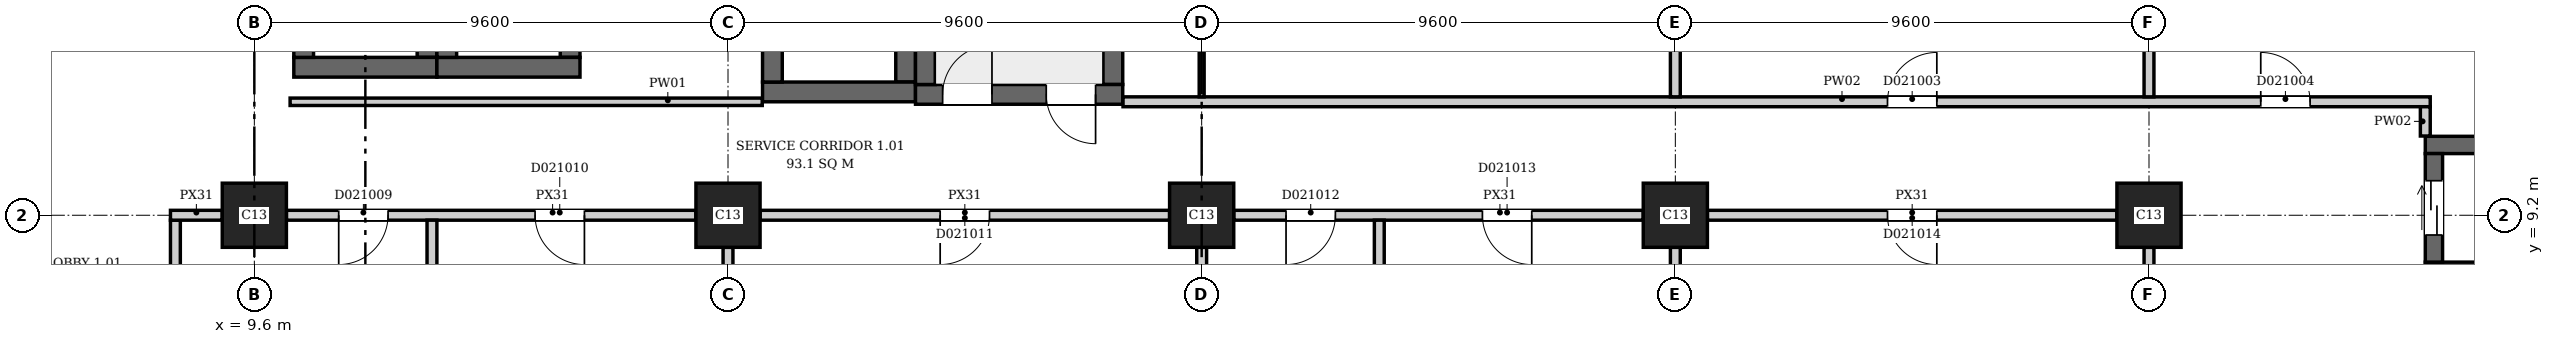
"""IFC4 building model, lengths in metres.
Left out: names, types, materials, properties, quantities, classifications, styles, units other than length and angle.
Written with IfcOpenShell. Run it as: python <this file> out.ifc"""

import sys

from ifc_helpers import new_model, si_unit, direction, frame, frame_2d, origin, origin_2d, place, context, subcontext, project, spatial, rectangle, extrude, element, fill, save


model = new_model("IFC4")
c1 = context("Model", 3, precision=1e-05, world=origin(), true_north=direction((0.0, 1.0)))
c2 = subcontext(c1, "Body", "Model", "MODEL_VIEW")
j1 = project(units=[si_unit("LENGTHUNIT", "METRE"), si_unit("PLANEANGLEUNIT", "RADIAN")], contexts=[c1])
p1 = place(None, origin())
s1 = spatial("IfcSite", under=j1, at=p1, CompositionType="ELEMENT")
p2 = place(p1, origin())
s2 = spatial("IfcBuilding", under=s1, at=p2, CompositionType="ELEMENT")
p3 = place(p2, frame((0.0, 0.0, 6.5)))
s3 = spatial("IfcBuildingStorey", under=s2, at=p3, CompositionType="ELEMENT", Elevation=6.5)
p4 = place(p3, frame((23.0, 11.65, 0.0), z_axis=(0.0, 0.0, 1.0), x_axis=(1.0, 0.0, 0.0)))
e1 = element("IfcWall", 1, at=p4, inside=s3, PredefinedType="SHEAR", context=c2, shape_type="SweptSolid", body=[
    extrude(rectangle(XDim=4.2, YDim=0.4, at=frame_2d((2.1, 0.0))), origin(), (0.0, 0.0, 1.0), 7.7),
])
p5 = place(p4, frame((0.55, 0.0, 0.0)))
e2 = element("IfcOpeningElement", 2, at=p5, cuts=e1, PredefinedType="OPENING", context=c2, shape_type="SweptSolid", body=[
    extrude(rectangle(XDim=1.0, YDim=2.1, at=frame_2d((0.5, 1.05))), frame((0.0, 0.21, 0.0), z_axis=(0.0, -1.0, 0.0), x_axis=(1.0, 0.0, 0.0)), (0.0, 0.0, 1.0), 0.42),
])
p6 = place(p4, frame((2.65, 0.0, 0.0)))
e3 = element("IfcOpeningElement", 3, at=p6, cuts=e1, PredefinedType="OPENING", context=c2, shape_type="SweptSolid", body=[
    extrude(rectangle(XDim=1.0, YDim=2.1, at=frame_2d((0.5, 1.05))), frame((0.0, 0.21, 0.0), z_axis=(0.0, -1.0, 0.0), x_axis=(1.0, 0.0, 0.0)), (0.0, 0.0, 1.0), 0.42),
])
for number, where, z_axis, x_axis in (
    (4, (23.2, 11.85, 0.0), (0.0, 0.0, 1.0), (0.0, 1.0, 0.0)),
    (5, (27.0, 11.85, 0.0), (0.0, 0.0, 1.0), (0.0, 1.0, 0.0)),
):
    element("IfcWall", number, at=place(p3, frame(where, z_axis=z_axis, x_axis=x_axis)), inside=s3, PredefinedType="SHEAR", context=c2, shape_type="SweptSolid", body=[
        extrude(rectangle(XDim=6.6, YDim=0.4, at=frame_2d((3.3, 0.0))), origin(), (0.0, 0.0, 1.0), 7.7),
    ])
for number, where, z_axis, x_axis in (
    (6, (53.6, 8.075, 0.0), (0.0, 0.0, 1.0), (1.0, 0.0, 0.0)),
    (7, (53.6, 10.625, 0.0), (0.0, 0.0, 1.0), (1.0, 0.0, 0.0)),
):
    element("IfcWall", number, at=place(p3, frame(where, z_axis=z_axis, x_axis=x_axis)), inside=s3, PredefinedType="SHEAR", context=c2, shape_type="SweptSolid", body=[
        extrude(rectangle(XDim=3.8, YDim=0.35, at=frame_2d((1.9, 0.0))), origin(), (0.0, 0.0, 1.0), 7.7),
    ])
p7 = place(p3, frame((53.775, 8.25, 0.0), z_axis=(0.0, 0.0, 1.0), x_axis=(0.0, 1.0, 0.0)))
e8 = element("IfcWall", 8, at=p7, inside=s3, PredefinedType="SHEAR", context=c2, shape_type="SweptSolid", body=[
    extrude(rectangle(XDim=2.2, YDim=0.35, at=frame_2d((1.1, 0.0))), origin(), (0.0, 0.0, 1.0), 7.7),
])
p8 = place(p7, frame((0.55, 0.0, 0.0)))
e9 = element("IfcOpeningElement", 9, at=p8, cuts=e8, PredefinedType="OPENING", context=c2, shape_type="SweptSolid", body=[
    extrude(rectangle(XDim=1.1, YDim=2.1, at=frame_2d((0.55, 1.05))), frame((0.0, 0.185, 0.0), z_axis=(0.0, -1.0, 0.0), x_axis=(1.0, 0.0, 0.0)), (0.0, 0.0, 1.0), 0.37),
])
p9 = place(p3, frame((10.4, 12.2, 0.0), z_axis=(0.0, 0.0, 1.0), x_axis=(1.0, 0.0, 0.0)))
e10 = element("IfcWall", 10, at=p9, inside=s3, PredefinedType="SHEAR", context=c2, shape_type="SweptSolid", body=[
    extrude(rectangle(XDim=2.9, YDim=0.4, at=frame_2d((1.45, 0.0))), origin(), (0.0, 0.0, 1.0), 7.7),
])
for number, where, z_axis, x_axis in (
    (11, (10.6, 12.4, 0.0), (0.0, 0.0, 1.0), (0.0, 1.0, 0.0)),
    (12, (13.1, 12.4, 0.0), (0.0, 0.0, 1.0), (0.0, 1.0, 0.0)),
):
    element("IfcWall", number, at=place(p3, frame(where, z_axis=z_axis, x_axis=x_axis)), inside=s3, PredefinedType="SHEAR", context=c2, shape_type="SweptSolid", body=[
        extrude(rectangle(XDim=3.0, YDim=0.4, at=frame_2d((1.5, 0.0))), origin(), (0.0, 0.0, 1.0), 7.7),
    ])
p10 = place(p3, frame((13.3, 12.2, 0.0), z_axis=(0.0, 0.0, 1.0), x_axis=(1.0, 0.0, 0.0)))
e13 = element("IfcWall", 13, at=p10, inside=s3, PredefinedType="SHEAR", context=c2, shape_type="SweptSolid", body=[
    extrude(rectangle(XDim=2.9, YDim=0.4, at=frame_2d((1.45, 0.0))), origin(), (0.0, 0.0, 1.0), 7.7),
])
for number, where, z_axis, x_axis in (
    (14, (13.5, 12.4, 0.0), (0.0, 0.0, 1.0), (0.0, 1.0, 0.0)),
    (15, (16.0, 12.4, 0.0), (0.0, 0.0, 1.0), (0.0, 1.0, 0.0)),
):
    element("IfcWall", number, at=place(p3, frame(where, z_axis=z_axis, x_axis=x_axis)), inside=s3, PredefinedType="SHEAR", context=c2, shape_type="SweptSolid", body=[
        extrude(rectangle(XDim=3.0, YDim=0.4, at=frame_2d((1.5, 0.0))), origin(), (0.0, 0.0, 1.0), 7.7),
    ])
p11 = place(p3, frame((19.9, 11.7, 0.0), z_axis=(0.0, 0.0, 1.0), x_axis=(1.0, 0.0, 0.0)))
e16 = element("IfcWall", 16, at=p11, inside=s3, PredefinedType="SHEAR", context=c2, shape_type="SweptSolid", body=[
    extrude(rectangle(XDim=3.1, YDim=0.4, at=frame_2d((1.55, 0.0))), origin(), (0.0, 0.0, 1.0), 7.7),
])
for number, where, z_axis, x_axis in (
    (17, (20.1, 11.9, 0.0), (0.0, 0.0, 1.0), (0.0, 1.0, 0.0)),
    (18, (22.8, 11.9, 0.0), (0.0, 0.0, 1.0), (0.0, 1.0, 0.0)),
):
    element("IfcWall", number, at=place(p3, frame(where, z_axis=z_axis, x_axis=x_axis)), inside=s3, PredefinedType="SHEAR", context=c2, shape_type="SweptSolid", body=[
        extrude(rectangle(XDim=3.4, YDim=0.4, at=frame_2d((1.7, 0.0))), origin(), (0.0, 0.0, 1.0), 7.7),
    ])
for number, where, z_axis, x_axis in (
    (19, (9.6, 9.2, 0.0), (0.0, 0.0, 1.0), (1.0, 0.0, 0.0)),
    (20, (19.2, 9.2, 0.0), (0.0, 0.0, 1.0), (1.0, 0.0, 0.0)),
    (21, (28.8, 9.2, 0.0), (0.0, 0.0, 1.0), (1.0, 0.0, 0.0)),
    (22, (38.4, 9.2, 0.0), (0.0, 0.0, 1.0), (1.0, 0.0, 0.0)),
    (23, (48.0, 9.2, 0.0), (0.0, 0.0, 1.0), (1.0, 0.0, 0.0)),
):
    element("IfcColumn", number, at=place(p3, frame(where, z_axis=z_axis, x_axis=x_axis)), inside=s3, PredefinedType="COLUMN", context=c2, shape_type="SweptSolid", body=[
        extrude(rectangle(XDim=1.3, YDim=1.3, at=origin_2d()), origin(), (0.0, 0.0, 1.0), 7.7),
    ])
p12 = place(p3, frame((8.0, 0.206, 0.0), z_axis=(0.0, 0.0, 1.0), x_axis=(0.0, 1.0, 0.0)))
e24 = element("IfcWall", 24, at=p12, inside=s3, PredefinedType="PARTITIONING", context=c2, shape_type="SweptSolid", body=[
    extrude(rectangle(XDim=8.894, YDim=0.2, at=frame_2d((4.447, 0.0))), origin(), (0.0, 0.0, 1.0), 7.35),
])
p13 = place(p3, frame((7.9, 9.2, 0.0), z_axis=(0.0, 0.0, 1.0), x_axis=(1.0, 0.0, 0.0)))
e25 = element("IfcWall", 25, at=p13, inside=s3, PredefinedType="PARTITIONING", context=c2, shape_type="SweptSolid", body=[
    extrude(rectangle(XDim=1.05, YDim=0.2, at=frame_2d((0.525, 0.0))), origin(), (0.0, 0.0, 1.0), 6.95),
])
p14 = place(p3, frame((10.25, 9.2, 0.0), z_axis=(0.0, 0.0, 1.0), x_axis=(1.0, 0.0, 0.0)))
e26 = element("IfcWall", 26, at=p14, inside=s3, PredefinedType="PARTITIONING", context=c2, shape_type="SweptSolid", body=[
    extrude(rectangle(XDim=8.3, YDim=0.2, at=frame_2d((4.15, 0.0))), origin(), (0.0, 0.0, 1.0), 6.95),
])
p15 = place(p14, frame((1.06, 0.0, 0.0)))
e27 = element("IfcOpeningElement", 27, at=p15, cuts=e26, PredefinedType="OPENING", context=c2, shape_type="SweptSolid", body=[
    extrude(rectangle(XDim=1.0, YDim=2.1, at=frame_2d((0.5, 1.05))), frame((0.0, 0.11, 0.0), z_axis=(0.0, -1.0, 0.0), x_axis=(1.0, 0.0, 0.0)), (0.0, 0.0, 1.0), 0.22),
])
p16 = place(p14, frame((5.04, 0.0, 0.0)))
e28 = element("IfcOpeningElement", 28, at=p16, cuts=e26, PredefinedType="OPENING", context=c2, shape_type="SweptSolid", body=[
    extrude(rectangle(XDim=1.0, YDim=2.1, at=frame_2d((0.5, 1.05))), frame((0.0, 0.11, 0.0), z_axis=(0.0, -1.0, 0.0), x_axis=(1.0, 0.0, 0.0)), (0.0, 0.0, 1.0), 0.22),
])
p17 = place(p3, frame((10.325, 11.5, 0.0), z_axis=(0.0, 0.0, 1.0), x_axis=(1.0, 0.0, 0.0)))
e29 = element("IfcWall", 29, at=p17, inside=s3, PredefinedType="PARTITIONING", context=c2, shape_type="SweptSolid", body=[
    extrude(rectangle(XDim=9.569, YDim=0.15, at=frame_2d((4.785, 0.0))), origin(), (0.0, 0.0, 1.0), 7.35),
])
p18 = place(p3, frame((13.2, 0.206, 0.0), z_axis=(0.0, 0.0, 1.0), x_axis=(0.0, 1.0, 0.0)))
e30 = element("IfcWall", 30, at=p18, inside=s3, PredefinedType="PARTITIONING", context=c2, shape_type="SweptSolid", body=[
    extrude(rectangle(XDim=8.894, YDim=0.2, at=frame_2d((4.447, 0.0))), origin(), (0.0, 0.0, 1.0), 7.35),
])
p19 = place(p3, frame((19.2, 1.1, 0.0), z_axis=(0.0, 0.0, 1.0), x_axis=(0.0, 1.0, 0.0)))
e31 = element("IfcWall", 31, at=p19, inside=s3, PredefinedType="PARTITIONING", context=c2, shape_type="SweptSolid", body=[
    extrude(rectangle(XDim=7.45, YDim=0.2, at=frame_2d((3.725, 0.0))), origin(), (0.0, 0.0, 1.0), 6.95),
])
p20 = place(p3, frame((19.85, 9.2, 0.0), z_axis=(0.0, 0.0, 1.0), x_axis=(1.0, 0.0, 0.0)))
e32 = element("IfcWall", 32, at=p20, inside=s3, PredefinedType="PARTITIONING", context=c2, shape_type="SweptSolid", body=[
    extrude(rectangle(XDim=8.3, YDim=0.2, at=frame_2d((4.15, 0.0))), origin(), (0.0, 0.0, 1.0), 6.95),
])
p21 = place(p20, frame((3.65, 0.0, 0.0)))
e33 = element("IfcOpeningElement", 33, at=p21, cuts=e32, PredefinedType="OPENING", context=c2, shape_type="SweptSolid", body=[
    extrude(rectangle(XDim=1.0, YDim=2.1, at=frame_2d((0.5, 1.05))), frame((0.0, 0.11, 0.0), z_axis=(0.0, -1.0, 0.0), x_axis=(1.0, 0.0, 0.0)), (0.0, 0.0, 1.0), 0.22),
])
p22 = place(p3, frame((27.206, 11.5, 0.0), z_axis=(0.0, 0.0, 1.0), x_axis=(1.0, 0.0, 0.0)))
e34 = element("IfcWall", 34, at=p22, inside=s3, PredefinedType="PARTITIONING", context=c2, shape_type="SweptSolid", body=[
    extrude(rectangle(XDim=26.494, YDim=0.2, at=frame_2d((13.247, 0.0))), origin(), (0.0, 0.0, 1.0), 7.35),
])
p23 = place(p22, frame((15.494, 0.0, 0.0)))
e35 = element("IfcOpeningElement", 35, at=p23, cuts=e34, PredefinedType="OPENING", context=c2, shape_type="SweptSolid", body=[
    extrude(rectangle(XDim=1.0, YDim=2.1, at=frame_2d((0.5, 1.05))), frame((0.0, 0.11, 0.0), z_axis=(0.0, -1.0, 0.0), x_axis=(1.0, 0.0, 0.0)), (0.0, 0.0, 1.0), 0.22),
])
p24 = place(p22, frame((23.059, 0.0, 0.0)))
e36 = element("IfcOpeningElement", 36, at=p24, cuts=e34, PredefinedType="OPENING", context=c2, shape_type="SweptSolid", body=[
    extrude(rectangle(XDim=1.0, YDim=2.1, at=frame_2d((0.5, 1.05))), frame((0.0, 0.11, 0.0), z_axis=(0.0, -1.0, 0.0), x_axis=(1.0, 0.0, 0.0)), (0.0, 0.0, 1.0), 0.22),
])
p25 = place(p3, frame((28.8, 1.1, 0.0), z_axis=(0.0, 0.0, 1.0), x_axis=(0.0, 1.0, 0.0)))
e37 = element("IfcWall", 37, at=p25, inside=s3, PredefinedType="PARTITIONING", context=c2, shape_type="SweptSolid", body=[
    extrude(rectangle(XDim=7.45, YDim=0.2, at=frame_2d((3.725, 0.0))), origin(), (0.0, 0.0, 1.0), 6.95),
])
p26 = place(p3, frame((28.8, 11.6, 0.0), z_axis=(0.0, 0.0, 1.0), x_axis=(0.0, 1.0, 0.0)))
e38 = element("IfcWall", 38, at=p26, inside=s3, PredefinedType="PARTITIONING", context=c2, shape_type="SweptSolid", body=[
    extrude(rectangle(XDim=4.025, YDim=0.1, at=frame_2d((2.012, 0.0))), origin(), (0.0, 0.0, 1.0), 6.95),
])
p27 = place(p3, frame((29.45, 9.2, 0.0), z_axis=(0.0, 0.0, 1.0), x_axis=(1.0, 0.0, 0.0)))
e39 = element("IfcWall", 39, at=p27, inside=s3, PredefinedType="PARTITIONING", context=c2, shape_type="SweptSolid", body=[
    extrude(rectangle(XDim=8.3, YDim=0.2, at=frame_2d((4.15, 0.0))), origin(), (0.0, 0.0, 1.0), 6.95),
])
p28 = place(p27, frame((1.06, 0.0, 0.0)))
e40 = element("IfcOpeningElement", 40, at=p28, cuts=e39, PredefinedType="OPENING", context=c2, shape_type="SweptSolid", body=[
    extrude(rectangle(XDim=1.0, YDim=2.1, at=frame_2d((0.5, 1.05))), frame((0.0, 0.11, 0.0), z_axis=(0.0, -1.0, 0.0), x_axis=(1.0, 0.0, 0.0)), (0.0, 0.0, 1.0), 0.22),
])
p29 = place(p27, frame((5.04, 0.0, 0.0)))
e41 = element("IfcOpeningElement", 41, at=p29, cuts=e39, PredefinedType="OPENING", context=c2, shape_type="SweptSolid", body=[
    extrude(rectangle(XDim=1.0, YDim=2.1, at=frame_2d((0.5, 1.05))), frame((0.0, 0.11, 0.0), z_axis=(0.0, -1.0, 0.0), x_axis=(1.0, 0.0, 0.0)), (0.0, 0.0, 1.0), 0.22),
])
p30 = place(p3, frame((32.4, 0.206, 0.0), z_axis=(0.0, 0.0, 1.0), x_axis=(0.0, 1.0, 0.0)))
e42 = element("IfcWall", 42, at=p30, inside=s3, PredefinedType="PARTITIONING", context=c2, shape_type="SweptSolid", body=[
    extrude(rectangle(XDim=8.894, YDim=0.2, at=frame_2d((4.447, 0.0))), origin(), (0.0, 0.0, 1.0), 7.35),
])
p31 = place(p3, frame((38.4, 1.1, 0.0), z_axis=(0.0, 0.0, 1.0), x_axis=(0.0, 1.0, 0.0)))
e43 = element("IfcWall", 43, at=p31, inside=s3, PredefinedType="PARTITIONING", context=c2, shape_type="SweptSolid", body=[
    extrude(rectangle(XDim=7.45, YDim=0.2, at=frame_2d((3.725, 0.0))), origin(), (0.0, 0.0, 1.0), 6.95),
])
p32 = place(p3, frame((38.4, 11.6, 0.0), z_axis=(0.0, 0.0, 1.0), x_axis=(0.0, 1.0, 0.0)))
e44 = element("IfcWall", 44, at=p32, inside=s3, PredefinedType="PARTITIONING", context=c2, shape_type="SweptSolid", body=[
    extrude(rectangle(XDim=6.15, YDim=0.2, at=frame_2d((3.075, 0.0))), origin(), (0.0, 0.0, 1.0), 6.95),
])
p33 = place(p3, frame((39.05, 9.2, 0.0), z_axis=(0.0, 0.0, 1.0), x_axis=(1.0, 0.0, 0.0)))
e45 = element("IfcWall", 45, at=p33, inside=s3, PredefinedType="PARTITIONING", context=c2, shape_type="SweptSolid", body=[
    extrude(rectangle(XDim=8.3, YDim=0.2, at=frame_2d((4.15, 0.0))), origin(), (0.0, 0.0, 1.0), 6.95),
])
p34 = place(p33, frame((3.65, 0.0, 0.0)))
e46 = element("IfcOpeningElement", 46, at=p34, cuts=e45, PredefinedType="OPENING", context=c2, shape_type="SweptSolid", body=[
    extrude(rectangle(XDim=1.0, YDim=2.1, at=frame_2d((0.5, 1.05))), frame((0.0, 0.11, 0.0), z_axis=(0.0, -1.0, 0.0), x_axis=(1.0, 0.0, 0.0)), (0.0, 0.0, 1.0), 0.22),
])
p35 = place(p3, frame((48.0, 1.1, 0.0), z_axis=(0.0, 0.0, 1.0), x_axis=(0.0, 1.0, 0.0)))
e47 = element("IfcWall", 47, at=p35, inside=s3, PredefinedType="PARTITIONING", context=c2, shape_type="SweptSolid", body=[
    extrude(rectangle(XDim=7.45, YDim=0.2, at=frame_2d((3.725, 0.0))), origin(), (0.0, 0.0, 1.0), 6.95),
])
p36 = place(p3, frame((48.0, 11.6, 0.0), z_axis=(0.0, 0.0, 1.0), x_axis=(0.0, 1.0, 0.0)))
e48 = element("IfcWall", 48, at=p36, inside=s3, PredefinedType="PARTITIONING", context=c2, shape_type="SweptSolid", body=[
    extrude(rectangle(XDim=6.15, YDim=0.2, at=frame_2d((3.075, 0.0))), origin(), (0.0, 0.0, 1.0), 6.95),
])
p37 = place(p3, frame((53.6, 10.806, 0.0), z_axis=(0.0, 0.0, 1.0), x_axis=(0.0, 1.0, 0.0)))
e49 = element("IfcWall", 49, at=p37, inside=s3, PredefinedType="PARTITIONING", context=c2, shape_type="SweptSolid", body=[
    extrude(rectangle(XDim=0.594, YDim=0.2, at=frame_2d((0.297, 0.0))), origin(), (0.0, 0.0, 1.0), 7.35),
])
p38 = place(p5, origin())
e50 = element("IfcDoor", 50, at=p38, inside=s3, OperationType="SINGLE_SWING_RIGHT", PredefinedType="DOOR", context=c2, shape_type="SweptSolid", body=[
    extrude(rectangle(XDim=1.0, YDim=2.1, at=frame_2d((0.5, 1.05))), frame((0.0, 0.025, 0.0), z_axis=(0.0, -1.0, 0.0), x_axis=(1.0, 0.0, 0.0)), (0.0, 0.0, 1.0), 0.05),
])
fill(e2, e50)
p39 = place(p6, origin())
e51 = element("IfcDoor", 51, at=p39, inside=s3, OperationType="SINGLE_SWING_LEFT", PredefinedType="DOOR", context=c2, shape_type="SweptSolid", body=[
    extrude(rectangle(XDim=1.0, YDim=2.1, at=frame_2d((0.5, 1.05))), frame((0.0, 0.025, 0.0), z_axis=(0.0, -1.0, 0.0), x_axis=(1.0, 0.0, 0.0)), (0.0, 0.0, 1.0), 0.05),
])
fill(e3, e51)
p40 = place(p8, origin())
e52 = element("IfcDoor", 52, at=p40, inside=s3, OperationType="DOUBLE_DOOR_SLIDING", PredefinedType="DOOR", context=c2, shape_type="SweptSolid", body=[
    extrude(rectangle(XDim=1.1, YDim=2.1, at=frame_2d((0.55, 1.05))), frame((0.0, 0.025, 0.0), z_axis=(0.0, -1.0, 0.0), x_axis=(1.0, 0.0, 0.0)), (0.0, 0.0, 1.0), 0.05),
])
fill(e9, e52)
p41 = place(p23, origin())
e53 = element("IfcDoor", 53, at=p41, inside=s3, OperationType="SINGLE_SWING_RIGHT", PredefinedType="DOOR", context=c2, shape_type="SweptSolid", body=[
    extrude(rectangle(XDim=1.0, YDim=2.1, at=frame_2d((0.5, 1.05))), frame((0.0, 0.025, 0.0), z_axis=(0.0, -1.0, 0.0), x_axis=(1.0, 0.0, 0.0)), (0.0, 0.0, 1.0), 0.05),
])
fill(e35, e53)
p42 = place(p24, origin())
e54 = element("IfcDoor", 54, at=p42, inside=s3, OperationType="SINGLE_SWING_LEFT", PredefinedType="DOOR", context=c2, shape_type="SweptSolid", body=[
    extrude(rectangle(XDim=1.0, YDim=2.1, at=frame_2d((0.5, 1.05))), frame((0.0, 0.025, 0.0), z_axis=(0.0, -1.0, 0.0), x_axis=(1.0, 0.0, 0.0)), (0.0, 0.0, 1.0), 0.05),
])
fill(e36, e54)
p43 = place(p15, origin())
e55 = element("IfcDoor", 55, at=p43, inside=s3, OperationType="SINGLE_SWING_LEFT", PredefinedType="DOOR", context=c2, shape_type="SweptSolid", body=[
    extrude(rectangle(XDim=1.0, YDim=2.1, at=frame_2d((0.5, 1.05))), frame((0.0, 0.025, 0.0), z_axis=(0.0, -1.0, 0.0), x_axis=(1.0, 0.0, 0.0)), (0.0, 0.0, 1.0), 0.05),
])
fill(e27, e55)
p44 = place(p16, origin())
e56 = element("IfcDoor", 56, at=p44, inside=s3, OperationType="SINGLE_SWING_RIGHT", PredefinedType="DOOR", context=c2, shape_type="SweptSolid", body=[
    extrude(rectangle(XDim=1.0, YDim=2.1, at=frame_2d((0.5, 1.05))), frame((0.0, 0.025, 0.0), z_axis=(0.0, -1.0, 0.0), x_axis=(1.0, 0.0, 0.0)), (0.0, 0.0, 1.0), 0.05),
])
fill(e28, e56)
p45 = place(p21, origin())
e57 = element("IfcDoor", 57, at=p45, inside=s3, OperationType="SINGLE_SWING_LEFT", PredefinedType="DOOR", context=c2, shape_type="SweptSolid", body=[
    extrude(rectangle(XDim=1.0, YDim=2.1, at=frame_2d((0.5, 1.05))), frame((0.0, 0.025, 0.0), z_axis=(0.0, -1.0, 0.0), x_axis=(1.0, 0.0, 0.0)), (0.0, 0.0, 1.0), 0.05),
])
fill(e33, e57)
p46 = place(p28, origin())
e58 = element("IfcDoor", 58, at=p46, inside=s3, OperationType="SINGLE_SWING_LEFT", PredefinedType="DOOR", context=c2, shape_type="SweptSolid", body=[
    extrude(rectangle(XDim=1.0, YDim=2.1, at=frame_2d((0.5, 1.05))), frame((0.0, 0.025, 0.0), z_axis=(0.0, -1.0, 0.0), x_axis=(1.0, 0.0, 0.0)), (0.0, 0.0, 1.0), 0.05),
])
fill(e40, e58)
p47 = place(p29, origin())
e59 = element("IfcDoor", 59, at=p47, inside=s3, OperationType="SINGLE_SWING_RIGHT", PredefinedType="DOOR", context=c2, shape_type="SweptSolid", body=[
    extrude(rectangle(XDim=1.0, YDim=2.1, at=frame_2d((0.5, 1.05))), frame((0.0, 0.025, 0.0), z_axis=(0.0, -1.0, 0.0), x_axis=(1.0, 0.0, 0.0)), (0.0, 0.0, 1.0), 0.05),
])
fill(e41, e59)
p48 = place(p34, origin())
e60 = element("IfcDoor", 60, at=p48, inside=s3, OperationType="SINGLE_SWING_RIGHT", PredefinedType="DOOR", context=c2, shape_type="SweptSolid", body=[
    extrude(rectangle(XDim=1.0, YDim=2.1, at=frame_2d((0.5, 1.05))), frame((0.0, 0.025, 0.0), z_axis=(0.0, -1.0, 0.0), x_axis=(1.0, 0.0, 0.0)), (0.0, 0.0, 1.0), 0.05),
])
fill(e46, e60)
save(model, sys.argv[1])
